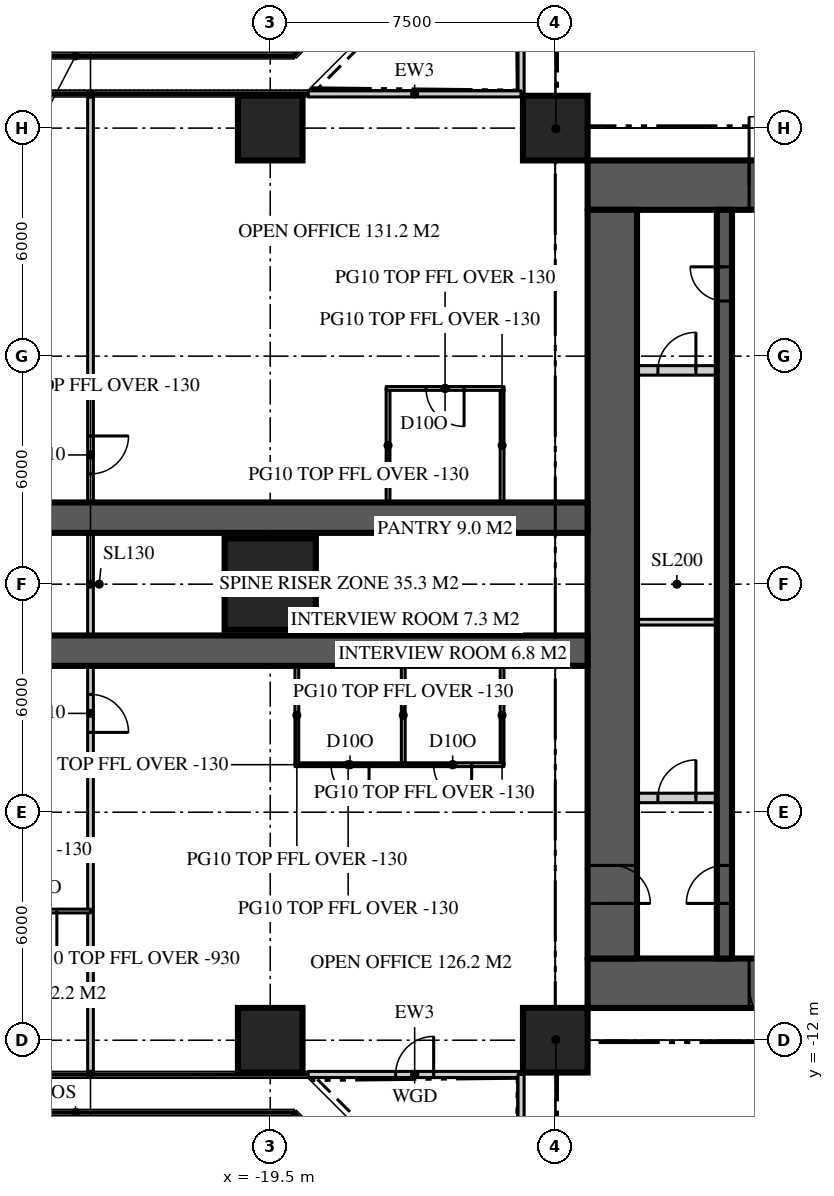
"""IFC4 building model, lengths in metres.
Left out: names, types, materials, properties, quantities, classifications, styles, units other than length and angle.
Written with IfcOpenShell. Run it as: python <this file> out.ifc"""

import sys

from ifc_helpers import new_model, si_unit, direction, frame, frame_2d, origin, origin_2d, place, context, subcontext, project, spatial, rectangle, extrude, element, fill, save


model = new_model("IFC4")
c1 = context("Model", 3, precision=1e-05, world=origin(), true_north=direction((0.0, 1.0)))
c2 = subcontext(c1, "Body", "Model", "MODEL_VIEW")
j1 = project(units=[si_unit("LENGTHUNIT", "METRE"), si_unit("PLANEANGLEUNIT", "RADIAN")], contexts=[c1])
p1 = place(None, origin())
s1 = spatial("IfcSite", under=j1, at=p1, CompositionType="ELEMENT")
p2 = place(p1, origin())
s2 = spatial("IfcBuilding", under=s1, at=p2, CompositionType="ELEMENT")
p3 = place(p2, frame((0.0, 0.0, 139.8)))
s3 = spatial("IfcBuildingStorey", under=s2, at=p3, CompositionType="ELEMENT", Elevation=139.8)
p4 = place(p3, frame((-11.15, 10.5, 0.0), z_axis=(0.0, 0.0, 1.0), x_axis=(1.0, 0.0, 0.0)))
e1 = element("IfcWall", 1, at=p4, inside=s3, PredefinedType="SHEAR", context=c2, shape_type="SweptSolid", body=[
    extrude(rectangle(XDim=22.3, YDim=1.3, at=frame_2d((11.15, 0.0))), origin(), (0.0, 0.0, 1.0), 3.9),
])
p5 = place(p4, frame((4.25, 0.0, 0.0)))
e2 = element("IfcOpeningElement", 2, at=p5, cuts=e1, PredefinedType="OPENING", context=c2, shape_type="SweptSolid", body=[
    extrude(rectangle(XDim=1.8, YDim=2.2, at=frame_2d((0.9, 1.1))), frame((0.0, 0.66, 0.0), z_axis=(0.0, -1.0, 0.0), x_axis=(1.0, 0.0, 0.0)), (0.0, 0.0, 1.0), 1.32),
])
p6 = place(p4, frame((16.25, 0.0, 0.0)))
e3 = element("IfcOpeningElement", 3, at=p6, cuts=e1, PredefinedType="OPENING", context=c2, shape_type="SweptSolid", body=[
    extrude(rectangle(XDim=1.8, YDim=2.2, at=frame_2d((0.9, 1.1))), frame((0.0, 0.66, 0.0), z_axis=(0.0, -1.0, 0.0), x_axis=(1.0, 0.0, 0.0)), (0.0, 0.0, 1.0), 1.32),
])
p7 = place(p3, frame((11.15, -10.5, 0.0), z_axis=(0.0, 0.0, 1.0), x_axis=(-1.0, 0.0, 0.0)))
e4 = element("IfcWall", 4, at=p7, inside=s3, PredefinedType="SHEAR", context=c2, shape_type="SweptSolid", body=[
    extrude(rectangle(XDim=22.3, YDim=1.3, at=frame_2d((11.15, 0.0))), origin(), (0.0, 0.0, 1.0), 3.9),
])
p8 = place(p7, frame((16.25, 0.0, 0.0)))
e5 = element("IfcOpeningElement", 5, at=p8, cuts=e4, PredefinedType="OPENING", context=c2, shape_type="SweptSolid", body=[
    extrude(rectangle(XDim=1.8, YDim=2.2, at=frame_2d((0.9, 1.1))), frame((0.0, 0.66, 0.0), z_axis=(0.0, -1.0, 0.0), x_axis=(1.0, 0.0, 0.0)), (0.0, 0.0, 1.0), 1.32),
])
p9 = place(p7, frame((4.25, 0.0, 0.0)))
e6 = element("IfcOpeningElement", 6, at=p9, cuts=e4, PredefinedType="OPENING", context=c2, shape_type="SweptSolid", body=[
    extrude(rectangle(XDim=1.8, YDim=2.2, at=frame_2d((0.9, 1.1))), frame((0.0, 0.66, 0.0), z_axis=(0.0, -1.0, 0.0), x_axis=(1.0, 0.0, 0.0)), (0.0, 0.0, 1.0), 1.32),
])
p10 = place(p3, frame((-10.5, 9.85, 0.0), z_axis=(0.0, 0.0, 1.0), x_axis=(0.0, -1.0, 0.0)))
e7 = element("IfcWall", 7, at=p10, inside=s3, PredefinedType="SHEAR", context=c2, shape_type="SweptSolid", body=[
    extrude(rectangle(XDim=19.7, YDim=1.3, at=frame_2d((9.85, 0.0))), origin(), (0.0, 0.0, 1.0), 3.9),
])
p11 = place(p10, frame((17.25, 0.0, 0.0)))
e8 = element("IfcOpeningElement", 8, at=p11, cuts=e7, PredefinedType="OPENING", context=c2, shape_type="SweptSolid", body=[
    extrude(rectangle(XDim=1.0, YDim=2.2, at=frame_2d((0.5, 1.1))), frame((0.0, 0.66, 0.0), z_axis=(0.0, -1.0, 0.0), x_axis=(1.0, 0.0, 0.0)), (0.0, 0.0, 1.0), 1.32),
])
for number, where, z_axis, x_axis in (
    (9, (-11.15, 1.75, 0.0), (0.0, 0.0, 1.0), (-1.0, 0.0, 0.0)),
    (10, (-11.15, -1.75, 0.0), (0.0, 0.0, 1.0), (-1.0, 0.0, 0.0)),
):
    element("IfcWall", number, at=place(p3, frame(where, z_axis=z_axis, x_axis=x_axis)), inside=s3, PredefinedType="SHEAR", context=c2, shape_type="SweptSolid", body=[
        extrude(rectangle(XDim=15.25, YDim=0.8, at=frame_2d((7.625, 0.0))), origin(), (0.0, 0.0, 1.0), 3.9),
    ])
for number, where, z_axis, x_axis in (
    (11, (-19.5, -12.0, 0.0), (0.0, 0.0, 1.0), (1.0, 0.0, 0.0)),
    (12, (-12.0, -12.0, 0.0), (0.0, 0.0, 1.0), (1.0, 0.0, 0.0)),
):
    element("IfcColumn", number, at=place(p3, frame(where, z_axis=z_axis, x_axis=x_axis)), inside=s3, PredefinedType="COLUMN", context=c2, shape_type="SweptSolid", body=[
        extrude(rectangle(XDim=1.7, YDim=1.7, at=origin_2d()), origin(), (0.0, 0.0, 1.0), 3.9),
    ])
p12 = place(p3, frame((-19.5, 0.0, 0.0), z_axis=(0.0, 0.0, 1.0), x_axis=(1.0, 0.0, 0.0)))
e13 = element("IfcColumn", 13, at=p12, inside=s3, PredefinedType="COLUMN", context=c2, shape_type="SweptSolid", body=[
    extrude(rectangle(XDim=2.4, YDim=2.4, at=origin_2d()), origin(), (0.0, 0.0, 1.0), 3.9),
])
for number, where, z_axis, x_axis in (
    (14, (-19.5, 12.0, 0.0), (0.0, 0.0, 1.0), (1.0, 0.0, 0.0)),
    (15, (-12.0, 12.0, 0.0), (0.0, 0.0, 1.0), (1.0, 0.0, 0.0)),
):
    element("IfcColumn", number, at=place(p3, frame(where, z_axis=z_axis, x_axis=x_axis)), inside=s3, PredefinedType="COLUMN", context=c2, shape_type="SweptSolid", body=[
        extrude(rectangle(XDim=1.7, YDim=1.7, at=origin_2d()), origin(), (0.0, 0.0, 1.0), 3.9),
    ])
p13 = place(p3, frame((-12.9, 18.5, 0.0), z_axis=(0.0, 0.0, 1.0), x_axis=(0.0, -1.0, 0.0)))
e16 = element("IfcWall", 16, at=p13, inside=s3, PredefinedType="SOLIDWALL", context=c2, shape_type="SweptSolid", body=[
    extrude(rectangle(XDim=5.6, YDim=0.16, at=frame_2d((2.8, 0.0))), origin(), (0.0, 0.0, 1.0), 3.77),
])
p14 = place(p13, frame((2.3, 0.0, 0.0)))
e17 = element("IfcOpeningElement", 17, at=p14, cuts=e16, PredefinedType="OPENING", context=c2, shape_type="SweptSolid", body=[
    extrude(rectangle(XDim=1.0, YDim=2.2, at=frame_2d((0.5, 1.1))), frame((0.0, 0.09, 0.0), z_axis=(0.0, -1.0, 0.0), x_axis=(1.0, 0.0, 0.0)), (0.0, 0.0, 1.0), 0.18),
])
p15 = place(p3, frame((-12.9, 12.9, 0.0), z_axis=(0.0, 0.0, 1.0), x_axis=(-1.0, 0.0, 0.0)))
e18 = element("IfcWall", 18, at=p15, inside=s3, PredefinedType="SOLIDWALL", context=c2, shape_type="SweptSolid", body=[
    extrude(rectangle(XDim=5.6, YDim=0.16, at=frame_2d((2.8, 0.0))), origin(), (0.0, 0.0, 1.0), 3.77),
])
p16 = place(p3, frame((-18.5, -12.9, 0.0), z_axis=(0.0, 0.0, 1.0), x_axis=(1.0, 0.0, 0.0)))
e19 = element("IfcWall", 19, at=p16, inside=s3, PredefinedType="SOLIDWALL", context=c2, shape_type="SweptSolid", body=[
    extrude(rectangle(XDim=5.6, YDim=0.16, at=frame_2d((2.8, 0.0))), origin(), (0.0, 0.0, 1.0), 3.77),
])
p17 = place(p16, frame((2.3, 0.0, 0.0)))
e20 = element("IfcOpeningElement", 20, at=p17, cuts=e19, PredefinedType="OPENING", context=c2, shape_type="SweptSolid", body=[
    extrude(rectangle(XDim=1.0, YDim=2.2, at=frame_2d((0.5, 1.1))), frame((0.0, 0.09, 0.0), z_axis=(0.0, -1.0, 0.0), x_axis=(1.0, 0.0, 0.0)), (0.0, 0.0, 1.0), 0.18),
])
p18 = place(p3, frame((-12.9, -12.9, 0.0), z_axis=(0.0, 0.0, 1.0), x_axis=(0.0, -1.0, 0.0)))
e21 = element("IfcWall", 21, at=p18, inside=s3, PredefinedType="SOLIDWALL", context=c2, shape_type="SweptSolid", body=[
    extrude(rectangle(XDim=5.6, YDim=0.16, at=frame_2d((2.8, 0.0))), origin(), (0.0, 0.0, 1.0), 3.77),
])
p19 = place(p3, frame((-7.55, -9.85, 0.0), z_axis=(0.0, 0.0, 1.0), x_axis=(0.0, 1.0, 0.0)))
e22 = element("IfcWall", 22, at=p19, inside=s3, PredefinedType="SHEAR", context=c2, shape_type="SweptSolid", body=[
    extrude(rectangle(XDim=19.7, YDim=0.4, at=frame_2d((9.85, 0.0))), origin(), (0.0, 0.0, 1.0), 3.9),
])
p20 = place(p19, frame((1.45, 0.0, 0.0)))
e23 = element("IfcOpeningElement", 23, at=p20, cuts=e22, PredefinedType="OPENING", context=c2, shape_type="SweptSolid", body=[
    extrude(rectangle(XDim=1.0, YDim=2.2, at=frame_2d((0.5, 1.1))), frame((0.0, 0.21, 0.0), z_axis=(0.0, -1.0, 0.0), x_axis=(1.0, 0.0, 0.0)), (0.0, 0.0, 1.0), 0.42),
])
p21 = place(p19, frame((17.3, 0.0, 0.0)))
e24 = element("IfcOpeningElement", 24, at=p21, cuts=e22, PredefinedType="OPENING", context=c2, shape_type="SweptSolid", body=[
    extrude(rectangle(XDim=0.9, YDim=2.1, at=frame_2d((0.45, 1.05))), frame((0.0, 0.21, 0.0), z_axis=(0.0, -1.0, 0.0), x_axis=(1.0, 0.0, 0.0)), (0.0, 0.0, 1.0), 0.42),
])
p22 = place(p3, frame((-9.85, 5.625, 0.0), z_axis=(0.0, 0.0, 1.0), x_axis=(1.0, 0.0, 0.0)))
e25 = element("IfcWall", 25, at=p22, inside=s3, PredefinedType="SOLIDWALL", context=c2, shape_type="SweptSolid", body=[
    extrude(rectangle(XDim=2.1, YDim=0.25, at=frame_2d((1.05, 0.0))), origin(), (0.0, 0.0, 1.0), 3.7),
])
p23 = place(p22, frame((0.55, 0.0, 0.0)))
e26 = element("IfcOpeningElement", 26, at=p23, cuts=e25, PredefinedType="OPENING", context=c2, shape_type="SweptSolid", body=[
    extrude(rectangle(XDim=1.0, YDim=2.2, at=frame_2d((0.5, 1.1))), frame((0.0, 0.135, 0.0), z_axis=(0.0, -1.0, 0.0), x_axis=(1.0, 0.0, 0.0)), (0.0, 0.0, 1.0), 0.27),
])
p24 = place(p3, frame((-9.85, -5.625, 0.0), z_axis=(0.0, 0.0, 1.0), x_axis=(1.0, 0.0, 0.0)))
e27 = element("IfcWall", 27, at=p24, inside=s3, PredefinedType="SOLIDWALL", context=c2, shape_type="SweptSolid", body=[
    extrude(rectangle(XDim=2.1, YDim=0.25, at=frame_2d((1.05, 0.0))), origin(), (0.0, 0.0, 1.0), 3.7),
])
p25 = place(p24, frame((0.55, 0.0, 0.0)))
e28 = element("IfcOpeningElement", 28, at=p25, cuts=e27, PredefinedType="OPENING", context=c2, shape_type="SweptSolid", body=[
    extrude(rectangle(XDim=1.0, YDim=2.2, at=frame_2d((0.5, 1.1))), frame((0.0, 0.135, 0.0), z_axis=(0.0, -1.0, 0.0), x_axis=(1.0, 0.0, 0.0)), (0.0, 0.0, 1.0), 0.27),
])
p26 = place(p3, frame((-24.229, 12.82, 0.0), z_axis=(0.0, 0.0, 1.0), x_axis=(0.0, -1.0, 0.0)))
e29 = element("IfcWall", 29, at=p26, inside=s3, PredefinedType="PARTITIONING", context=c2, shape_type="SweptSolid", body=[
    extrude(rectangle(XDim=25.64, YDim=0.15, at=frame_2d((12.82, 0.0))), origin(), (0.0, 0.0, 1.0), 3.77),
])
p27 = place(p26, frame((15.72, 0.0, 0.0)))
e30 = element("IfcOpeningElement", 30, at=p27, cuts=e29, PredefinedType="OPENING", context=c2, shape_type="SweptSolid", body=[
    extrude(rectangle(XDim=1.0, YDim=2.2, at=frame_2d((0.5, 1.1))), frame((0.0, 0.085, 0.0), z_axis=(0.0, -1.0, 0.0), x_axis=(1.0, 0.0, 0.0)), (0.0, 0.0, 1.0), 0.17),
])
p28 = place(p26, frame((8.92, 0.0, 0.0)))
e31 = element("IfcOpeningElement", 31, at=p28, cuts=e29, PredefinedType="OPENING", context=c2, shape_type="SweptSolid", body=[
    extrude(rectangle(XDim=1.0, YDim=2.2, at=frame_2d((0.5, 1.1))), frame((0.0, 0.085, 0.0), z_axis=(0.0, -1.0, 0.0), x_axis=(1.0, 0.0, 0.0)), (0.0, 0.0, 1.0), 0.17),
])
p29 = place(p3, frame((-24.229, -8.6, 0.0), z_axis=(0.0, 0.0, 1.0), x_axis=(-1.0, 0.0, 0.0)))
e32 = element("IfcWall", 32, at=p29, inside=s3, PredefinedType="PARTITIONING", context=c2, shape_type="SweptSolid", body=[
    extrude(rectangle(XDim=5.73, YDim=0.1, at=frame_2d((2.865, 0.0))), origin(), (0.0, 0.0, 1.0), 3.77),
])
p30 = place(p29, frame((0.885, 0.0, 0.0)))
e33 = element("IfcOpeningElement", 33, at=p30, cuts=e32, PredefinedType="OPENING", context=c2, shape_type="SweptSolid", body=[
    extrude(rectangle(XDim=1.0, YDim=2.2, at=frame_2d((0.5, 1.1))), frame((0.0, 0.06, 0.0), z_axis=(0.0, -1.0, 0.0), x_axis=(1.0, 0.0, 0.0)), (0.0, 0.0, 1.0), 0.12),
])
p31 = place(p29, frame((3.75, 0.0, 0.0)))
e34 = element("IfcOpeningElement", 34, at=p31, cuts=e32, PredefinedType="OPENING", context=c2, shape_type="SweptSolid", body=[
    extrude(rectangle(XDim=1.0, YDim=2.2, at=frame_2d((0.5, 1.1))), frame((0.0, 0.06, 0.0), z_axis=(0.0, -1.0, 0.0), x_axis=(1.0, 0.0, 0.0)), (0.0, 0.0, 1.0), 0.12),
])
for number, where, z_axis, x_axis in (
    (35, (-13.4, -2.15, 0.0), (0.0, 0.0, 1.0), (0.0, -1.0, 0.0)),
    (36, (-16.0, -2.15, 0.0), (0.0, 0.0, 1.0), (0.0, -1.0, 0.0)),
):
    element("IfcWall", number, at=place(p3, frame(where, z_axis=z_axis, x_axis=x_axis)), inside=s3, PredefinedType="PARTITIONING", context=c2, shape_type="SweptSolid", body=[
        extrude(rectangle(XDim=2.6, YDim=0.1, at=frame_2d((1.3, 0.0))), origin(), (0.0, 0.0, 1.0), 3.77),
    ])
p32 = place(p3, frame((-13.35, -4.75, 0.0), z_axis=(0.0, 0.0, 1.0), x_axis=(-1.0, 0.0, 0.0)))
e37 = element("IfcWall", 37, at=p32, inside=s3, PredefinedType="PARTITIONING", context=c2, shape_type="SweptSolid", body=[
    extrude(rectangle(XDim=2.7, YDim=0.1, at=frame_2d((1.35, 0.0))), origin(), (0.0, 0.0, 1.0), 3.77),
])
p33 = place(p32, frame((0.85, 0.0, 0.0)))
e38 = element("IfcOpeningElement", 38, at=p33, cuts=e37, PredefinedType="OPENING", context=c2, shape_type="SweptSolid", body=[
    extrude(rectangle(XDim=1.0, YDim=2.2, at=frame_2d((0.5, 1.1))), frame((0.0, 0.06, 0.0), z_axis=(0.0, -1.0, 0.0), x_axis=(1.0, 0.0, 0.0)), (0.0, 0.0, 1.0), 0.12),
])
p34 = place(p3, frame((-18.8, -2.15, 0.0), z_axis=(0.0, 0.0, 1.0), x_axis=(0.0, -1.0, 0.0)))
e39 = element("IfcWall", 39, at=p34, inside=s3, PredefinedType="PARTITIONING", context=c2, shape_type="SweptSolid", body=[
    extrude(rectangle(XDim=2.6, YDim=0.1, at=frame_2d((1.3, 0.0))), origin(), (0.0, 0.0, 1.0), 3.77),
])
p35 = place(p3, frame((-16.05, -4.75, 0.0), z_axis=(0.0, 0.0, 1.0), x_axis=(-1.0, 0.0, 0.0)))
e40 = element("IfcWall", 40, at=p35, inside=s3, PredefinedType="PARTITIONING", context=c2, shape_type="SweptSolid", body=[
    extrude(rectangle(XDim=2.8, YDim=0.1, at=frame_2d((1.4, 0.0))), origin(), (0.0, 0.0, 1.0), 3.77),
])
p36 = place(p35, frame((0.85, 0.0, 0.0)))
e41 = element("IfcOpeningElement", 41, at=p36, cuts=e40, PredefinedType="OPENING", context=c2, shape_type="SweptSolid", body=[
    extrude(rectangle(XDim=1.0, YDim=2.2, at=frame_2d((0.5, 1.1))), frame((0.0, 0.06, 0.0), z_axis=(0.0, -1.0, 0.0), x_axis=(1.0, 0.0, 0.0)), (0.0, 0.0, 1.0), 0.12),
])
for number, where, z_axis, x_axis in (
    (42, (-13.4, 2.15, 0.0), (0.0, 0.0, 1.0), (0.0, 1.0, 0.0)),
    (43, (-16.4, 2.15, 0.0), (0.0, 0.0, 1.0), (0.0, 1.0, 0.0)),
):
    element("IfcWall", number, at=place(p3, frame(where, z_axis=z_axis, x_axis=x_axis)), inside=s3, PredefinedType="PARTITIONING", context=c2, shape_type="SweptSolid", body=[
        extrude(rectangle(XDim=3.0, YDim=0.1, at=frame_2d((1.5, 0.0))), origin(), (0.0, 0.0, 1.0), 3.77),
    ])
p37 = place(p3, frame((-13.35, 5.15, 0.0), z_axis=(0.0, 0.0, 1.0), x_axis=(-1.0, 0.0, 0.0)))
e44 = element("IfcWall", 44, at=p37, inside=s3, PredefinedType="PARTITIONING", context=c2, shape_type="SweptSolid", body=[
    extrude(rectangle(XDim=3.1, YDim=0.1, at=frame_2d((1.55, 0.0))), origin(), (0.0, 0.0, 1.0), 3.77),
])
p38 = place(p37, frame((1.05, 0.0, 0.0)))
e45 = element("IfcOpeningElement", 45, at=p38, cuts=e44, PredefinedType="OPENING", context=c2, shape_type="SweptSolid", body=[
    extrude(rectangle(XDim=1.0, YDim=2.2, at=frame_2d((0.5, 1.1))), frame((0.0, 0.06, 0.0), z_axis=(0.0, -1.0, 0.0), x_axis=(1.0, 0.0, 0.0)), (0.0, 0.0, 1.0), 0.12),
])
for number, where, z_axis, x_axis in (
    (46, (-11.15, 11.15, 0.0), (0.0, 0.0, 1.0), (-0.707, 0.707, 0.0)),
    (47, (-11.15, -11.15, 0.0), (0.0, 0.0, 1.0), (-0.707, -0.707, 0.0)),
):
    element("IfcWall", number, at=place(p3, frame(where, z_axis=z_axis, x_axis=x_axis)), inside=s3, PredefinedType="PARTITIONING", context=c2, shape_type="SweptSolid", body=[
        extrude(rectangle(XDim=2.362, YDim=0.15, at=frame_2d((1.181, 0.0))), origin(), (0.0, 0.0, 1.0), 3.22),
    ])
p39 = place(p3, frame((-9.85, -1.0, 0.0), z_axis=(0.0, 0.0, 1.0), x_axis=(1.0, 0.0, 0.0)))
e48 = element("IfcWall", 48, at=p39, inside=s3, PredefinedType="SOLIDWALL", context=c2, shape_type="SweptSolid", body=[
    extrude(rectangle(XDim=2.1, YDim=0.15, at=frame_2d((1.05, 0.0))), origin(), (0.0, 0.0, 1.0), 3.77),
])
p40 = place(p17, origin())
e49 = element("IfcDoor", 49, at=p40, inside=s3, OperationType="SINGLE_SWING_RIGHT", PredefinedType="DOOR", context=c2, shape_type="SweptSolid", body=[
    extrude(rectangle(XDim=1.0, YDim=2.2, at=frame_2d((0.5, 1.1))), frame((0.0, 0.025, 0.0), z_axis=(0.0, -1.0, 0.0), x_axis=(1.0, 0.0, 0.0)), (0.0, 0.0, 1.0), 0.05),
])
fill(e20, e49)
p41 = place(p5, origin())
e50 = element("IfcDoor", 50, at=p41, inside=s3, OperationType="DOUBLE_DOOR_DOUBLE_SWING", PredefinedType="DOOR", context=c2, shape_type="SweptSolid", body=[
    extrude(rectangle(XDim=1.8, YDim=2.2, at=frame_2d((0.9, 1.1))), frame((0.0, 0.025, 0.0), z_axis=(0.0, -1.0, 0.0), x_axis=(1.0, 0.0, 0.0)), (0.0, 0.0, 1.0), 0.05),
])
fill(e2, e50)
p42 = place(p8, origin())
e51 = element("IfcDoor", 51, at=p42, inside=s3, OperationType="DOUBLE_DOOR_DOUBLE_SWING", PredefinedType="DOOR", context=c2, shape_type="SweptSolid", body=[
    extrude(rectangle(XDim=1.8, YDim=2.2, at=frame_2d((0.9, 1.1))), frame((0.0, 0.025, 0.0), z_axis=(0.0, -1.0, 0.0), x_axis=(1.0, 0.0, 0.0)), (0.0, 0.0, 1.0), 0.05),
])
fill(e5, e51)
p43 = place(p20, origin())
e52 = element("IfcDoor", 52, at=p43, inside=s3, OperationType="SINGLE_SWING_LEFT", PredefinedType="DOOR", context=c2, shape_type="SweptSolid", body=[
    extrude(rectangle(XDim=1.0, YDim=2.2, at=frame_2d((0.5, 1.1))), frame((0.0, 0.025, 0.0), z_axis=(0.0, -1.0, 0.0), x_axis=(1.0, 0.0, 0.0)), (0.0, 0.0, 1.0), 0.05),
])
fill(e23, e52)
p44 = place(p11, origin())
e53 = element("IfcDoor", 53, at=p44, inside=s3, OperationType="SINGLE_SWING_RIGHT", PredefinedType="DOOR", context=c2, shape_type="SweptSolid", body=[
    extrude(rectangle(XDim=1.0, YDim=2.2, at=frame_2d((0.5, 1.1))), frame((0.0, 0.025, 0.0), z_axis=(0.0, -1.0, 0.0), x_axis=(1.0, 0.0, 0.0)), (0.0, 0.0, 1.0), 0.05),
])
fill(e8, e53)
p45 = place(p21, origin())
e54 = element("IfcDoor", 54, at=p45, inside=s3, OperationType="SINGLE_SWING_RIGHT", PredefinedType="DOOR", context=c2, shape_type="SweptSolid", body=[
    extrude(rectangle(XDim=0.9, YDim=2.1, at=frame_2d((0.45, 1.05))), frame((0.0, 0.025, 0.0), z_axis=(0.0, -1.0, 0.0), x_axis=(1.0, 0.0, 0.0)), (0.0, 0.0, 1.0), 0.05),
])
fill(e24, e54)
p46 = place(p27, origin())
e55 = element("IfcDoor", 55, at=p46, inside=s3, OperationType="SINGLE_SWING_RIGHT", PredefinedType="DOOR", context=c2, shape_type="SweptSolid", body=[
    extrude(rectangle(XDim=1.0, YDim=2.2, at=frame_2d((0.5, 1.1))), frame((0.0, 0.025, 0.0), z_axis=(0.0, -1.0, 0.0), x_axis=(1.0, 0.0, 0.0)), (0.0, 0.0, 1.0), 0.05),
])
fill(e30, e55)
p47 = place(p28, origin())
e56 = element("IfcDoor", 56, at=p47, inside=s3, OperationType="SINGLE_SWING_LEFT", PredefinedType="DOOR", context=c2, shape_type="SweptSolid", body=[
    extrude(rectangle(XDim=1.0, YDim=2.2, at=frame_2d((0.5, 1.1))), frame((0.0, 0.025, 0.0), z_axis=(0.0, -1.0, 0.0), x_axis=(1.0, 0.0, 0.0)), (0.0, 0.0, 1.0), 0.05),
])
fill(e31, e56)
p48 = place(p30, origin())
e57 = element("IfcDoor", 57, at=p48, inside=s3, OperationType="SINGLE_SWING_LEFT", PredefinedType="DOOR", context=c2, shape_type="SweptSolid", body=[
    extrude(rectangle(XDim=1.0, YDim=2.2, at=frame_2d((0.5, 1.1))), frame((0.0, 0.025, 0.0), z_axis=(0.0, -1.0, 0.0), x_axis=(1.0, 0.0, 0.0)), (0.0, 0.0, 1.0), 0.05),
])
fill(e33, e57)
p49 = place(p33, origin())
e58 = element("IfcDoor", 58, at=p49, inside=s3, OperationType="SINGLE_SWING_LEFT", PredefinedType="DOOR", context=c2, shape_type="SweptSolid", body=[
    extrude(rectangle(XDim=1.0, YDim=2.2, at=frame_2d((0.5, 1.1))), frame((0.0, 0.025, 0.0), z_axis=(0.0, -1.0, 0.0), x_axis=(1.0, 0.0, 0.0)), (0.0, 0.0, 1.0), 0.05),
])
fill(e38, e58)
p50 = place(p36, origin())
e59 = element("IfcDoor", 59, at=p50, inside=s3, OperationType="SINGLE_SWING_LEFT", PredefinedType="DOOR", context=c2, shape_type="SweptSolid", body=[
    extrude(rectangle(XDim=1.0, YDim=2.2, at=frame_2d((0.5, 1.1))), frame((0.0, 0.025, 0.0), z_axis=(0.0, -1.0, 0.0), x_axis=(1.0, 0.0, 0.0)), (0.0, 0.0, 1.0), 0.05),
])
fill(e41, e59)
p51 = place(p38, origin())
e60 = element("IfcDoor", 60, at=p51, inside=s3, OperationType="SINGLE_SWING_LEFT", PredefinedType="DOOR", context=c2, shape_type="SweptSolid", body=[
    extrude(rectangle(XDim=1.0, YDim=2.2, at=frame_2d((0.5, 1.1))), frame((0.0, 0.025, 0.0), z_axis=(0.0, -1.0, 0.0), x_axis=(1.0, 0.0, 0.0)), (0.0, 0.0, 1.0), 0.05),
])
fill(e45, e60)
p52 = place(p23, origin())
e61 = element("IfcDoor", 61, at=p52, inside=s3, OperationType="SINGLE_SWING_RIGHT", PredefinedType="DOOR", context=c2, shape_type="SweptSolid", body=[
    extrude(rectangle(XDim=1.0, YDim=2.2, at=frame_2d((0.5, 1.1))), frame((0.0, 0.025, 0.0), z_axis=(0.0, -1.0, 0.0), x_axis=(1.0, 0.0, 0.0)), (0.0, 0.0, 1.0), 0.05),
])
fill(e26, e61)
p53 = place(p25, origin())
e62 = element("IfcDoor", 62, at=p53, inside=s3, OperationType="SINGLE_SWING_RIGHT", PredefinedType="DOOR", context=c2, shape_type="SweptSolid", body=[
    extrude(rectangle(XDim=1.0, YDim=2.2, at=frame_2d((0.5, 1.1))), frame((0.0, 0.025, 0.0), z_axis=(0.0, -1.0, 0.0), x_axis=(1.0, 0.0, 0.0)), (0.0, 0.0, 1.0), 0.05),
])
fill(e28, e62)
save(model, sys.argv[1])
